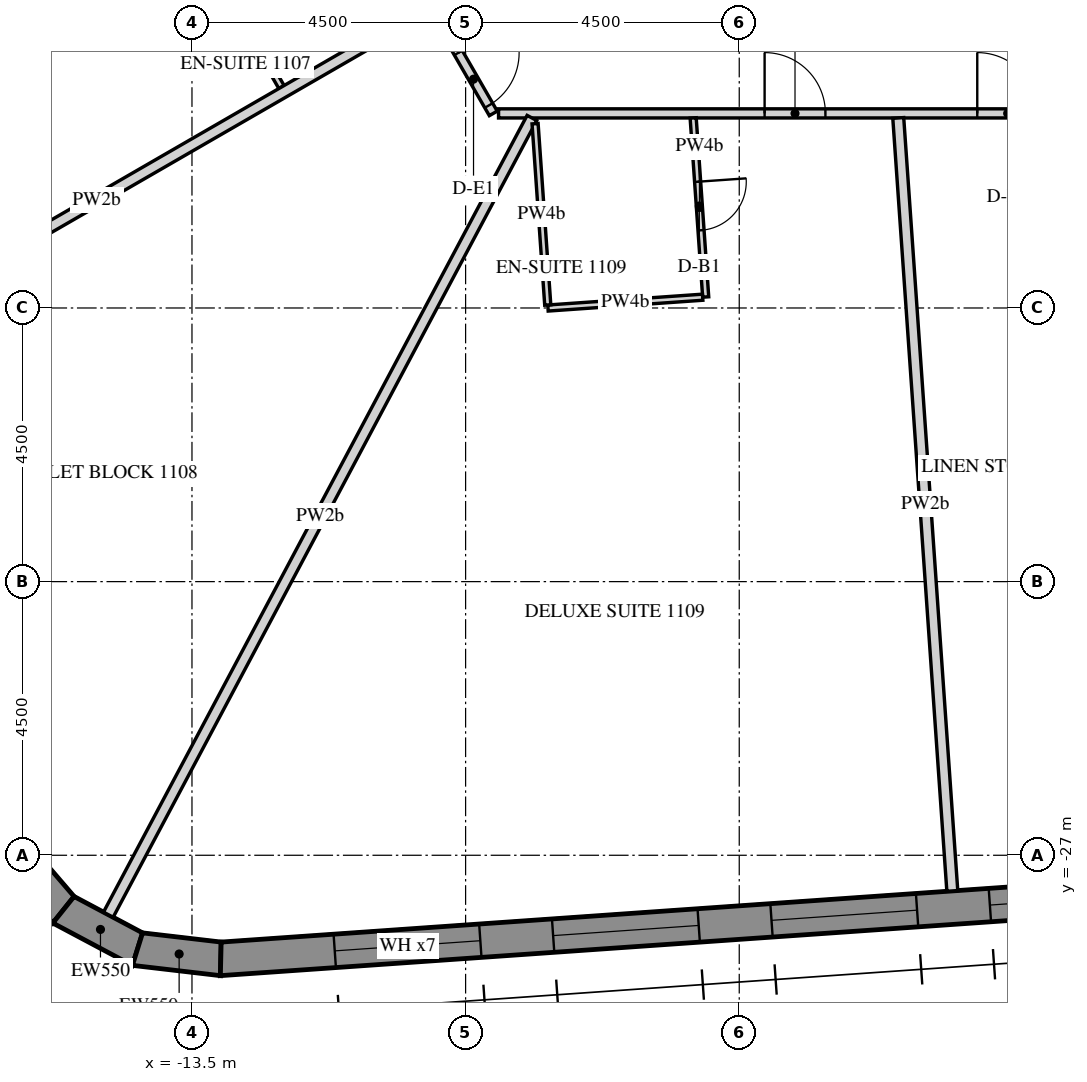
"""IFC4 building model, lengths in metres.
Left out: names, types, materials, properties, quantities, classifications, styles, units other than length and angle.
Written with IfcOpenShell. Run it as: python <this file> out.ifc"""

import sys

from ifc_helpers import new_model, si_unit, direction, frame, frame_2d, origin, place, context, subcontext, project, spatial, polyline, rectangle, outline, extrude, element, fill, save


model = new_model("IFC4")
c1 = context("Model", 3, precision=1e-05, world=origin(), true_north=direction((0.0, 1.0)))
c2 = subcontext(c1, "Body", "Model", "MODEL_VIEW")
j1 = project(units=[si_unit("LENGTHUNIT", "METRE"), si_unit("PLANEANGLEUNIT", "RADIAN")], contexts=[c1])
p1 = place(None, origin())
s1 = spatial("IfcSite", under=j1, at=p1, CompositionType="ELEMENT")
p2 = place(p1, origin())
s2 = spatial("IfcBuilding", under=s1, at=p2, CompositionType="ELEMENT")
p3 = place(p2, frame((0.0, 0.0, 156.6)))
s3 = spatial("IfcBuildingStorey", under=s2, at=p3, CompositionType="ELEMENT", Elevation=156.6)
p4 = place(p3, frame((-16.512, -26.85, -0.15), z_axis=(0.0, 0.0, 1.0), x_axis=(0.651621950847, -0.758543890078, 0.0)))
e1 = element("IfcWall", 1, at=p4, inside=s3, PredefinedType="SOLIDWALL", context=c2, shape_type="SweptSolid", body=[
    extrude(outline(polyline([(-0.026, -0.275), (1.431, -0.275), (1.327, 0.275), (0.026, 0.275), (-0.026, -0.275)])), origin(), (0.0, 0.0, 1.0), 3.9),
])
p5 = place(p3, frame((-15.614, -27.896, -0.15), z_axis=(0.0, 0.0, 1.0), x_axis=(0.882994189209, -0.469383917304, 0.0)))
e2 = element("IfcWall", 2, at=p5, inside=s3, PredefinedType="SOLIDWALL", context=c2, shape_type="SweptSolid", body=[
    extrude(outline(polyline([(-0.052, -0.275), (1.431, -0.275), (1.327, 0.275), (0.052, 0.275), (-0.052, -0.275)])), origin(), (0.0, 0.0, 1.0), 3.9),
])
p6 = place(p3, frame((-14.396, -28.543, -0.15), z_axis=(0.0, 0.0, 1.0), x_axis=(0.993232537394, -0.11614269956, 0.0)))
e3 = element("IfcWall", 3, at=p6, inside=s3, PredefinedType="SOLIDWALL", context=c2, shape_type="SweptSolid", body=[
    extrude(outline(polyline([(-0.052, -0.275), (1.405, -0.275), (1.353, 0.275), (0.052, 0.275), (-0.052, -0.275)])), origin(), (0.0, 0.0, 1.0), 3.9),
])
p7 = place(p3, frame((-13.026, -28.704, -0.15), z_axis=(0.0, 0.0, 1.0), x_axis=(0.99756406806, 0.069756219185, 0.0)))
e4 = element("IfcWall", 4, at=p7, inside=s3, PredefinedType="SOLIDWALL", context=c2, shape_type="SweptSolid", body=[
    extrude(outline(polyline([(-0.026, -0.275), (27.78, -0.275), (27.735, 0.275), (0.026, 0.275), (-0.026, -0.275)])), origin(), (0.0, 0.0, 1.0), 3.9),
])
p8 = place(p7, frame((1.879, 0.0, 1.05)))
e5 = element("IfcOpeningElement", 5, at=p8, cuts=e4, PredefinedType="OPENING", context=c2, shape_type="SweptSolid", body=[
    extrude(rectangle(XDim=2.4, YDim=2.4, at=frame_2d((1.2, 1.2))), frame((0.0, 0.285, 0.0), z_axis=(0.0, -1.0, 0.0), x_axis=(1.0, 0.0, 0.0)), (0.0, 0.0, 1.0), 0.57),
])
p9 = place(p7, frame((5.479, 0.0, 1.05)))
e6 = element("IfcOpeningElement", 6, at=p9, cuts=e4, PredefinedType="OPENING", context=c2, shape_type="SweptSolid", body=[
    extrude(rectangle(XDim=2.4, YDim=2.4, at=frame_2d((1.2, 1.2))), frame((0.0, 0.285, 0.0), z_axis=(0.0, -1.0, 0.0), x_axis=(1.0, 0.0, 0.0)), (0.0, 0.0, 1.0), 0.57),
])
p10 = place(p7, frame((9.079, 0.0, 1.05)))
e7 = element("IfcOpeningElement", 7, at=p10, cuts=e4, PredefinedType="OPENING", context=c2, shape_type="SweptSolid", body=[
    extrude(rectangle(XDim=2.4, YDim=2.4, at=frame_2d((1.2, 1.2))), frame((0.0, 0.285, 0.0), z_axis=(0.0, -1.0, 0.0), x_axis=(1.0, 0.0, 0.0)), (0.0, 0.0, 1.0), 0.57),
])
p11 = place(p7, frame((12.679, 0.0, 1.05)))
e8 = element("IfcOpeningElement", 8, at=p11, cuts=e4, PredefinedType="OPENING", context=c2, shape_type="SweptSolid", body=[
    extrude(rectangle(XDim=2.4, YDim=2.4, at=frame_2d((1.2, 1.2))), frame((0.0, 0.285, 0.0), z_axis=(0.0, -1.0, 0.0), x_axis=(1.0, 0.0, 0.0)), (0.0, 0.0, 1.0), 0.57),
])
p12 = place(p7, frame((16.279, 0.0, 1.05)))
e9 = element("IfcOpeningElement", 9, at=p12, cuts=e4, PredefinedType="OPENING", context=c2, shape_type="SweptSolid", body=[
    extrude(rectangle(XDim=2.4, YDim=2.4, at=frame_2d((1.2, 1.2))), frame((0.0, 0.285, 0.0), z_axis=(0.0, -1.0, 0.0), x_axis=(1.0, 0.0, 0.0)), (0.0, 0.0, 1.0), 0.57),
])
p13 = place(p7, frame((19.879, 0.0, 1.05)))
e10 = element("IfcOpeningElement", 10, at=p13, cuts=e4, PredefinedType="OPENING", context=c2, shape_type="SweptSolid", body=[
    extrude(rectangle(XDim=2.4, YDim=2.4, at=frame_2d((1.2, 1.2))), frame((0.0, 0.285, 0.0), z_axis=(0.0, -1.0, 0.0), x_axis=(1.0, 0.0, 0.0)), (0.0, 0.0, 1.0), 0.57),
])
p14 = place(p7, frame((23.479, 0.0, 1.05)))
e11 = element("IfcOpeningElement", 11, at=p14, cuts=e4, PredefinedType="OPENING", context=c2, shape_type="SweptSolid", body=[
    extrude(rectangle(XDim=2.4, YDim=2.4, at=frame_2d((1.2, 1.2))), frame((0.0, 0.285, 0.0), z_axis=(0.0, -1.0, 0.0), x_axis=(1.0, 0.0, 0.0)), (0.0, 0.0, 1.0), 0.57),
])
p15 = place(p3, frame((-15.863, -2.125, 0.0), z_axis=(0.0, 0.0, 1.0), x_axis=(0.500008833422, -0.866020303746, 0.0)))
e12 = element("IfcWall", 12, at=p15, inside=s3, PredefinedType="PARTITIONING", context=c2, shape_type="SweptSolid", body=[
    extrude(rectangle(XDim=14.636, YDim=0.15, at=frame_2d((7.318, 0.0))), origin(), (0.0, 0.0, 1.0), 2.823),
])
p16 = place(p15, frame((0.961, 0.0, 0.0)))
e13 = element("IfcOpeningElement", 13, at=p16, cuts=e12, PredefinedType="OPENING", context=c2, shape_type="SweptSolid", body=[
    extrude(rectangle(XDim=1.0, YDim=2.1, at=frame_2d((0.5, 1.05))), frame((0.0, 0.085, 0.0), z_axis=(0.0, -1.0, 0.0), x_axis=(1.0, 0.0, 0.0)), (0.0, 0.0, 1.0), 0.17),
])
p17 = place(p15, frame((7.309, 0.0, 0.0)))
e14 = element("IfcOpeningElement", 14, at=p17, cuts=e12, PredefinedType="OPENING", context=c2, shape_type="SweptSolid", body=[
    extrude(rectangle(XDim=1.0, YDim=2.1, at=frame_2d((0.5, 1.05))), frame((0.0, 0.085, 0.0), z_axis=(0.0, -1.0, 0.0), x_axis=(1.0, 0.0, 0.0)), (0.0, 0.0, 1.0), 0.17),
])
p18 = place(p15, frame((13.486, 0.0, 0.0)))
e15 = element("IfcOpeningElement", 15, at=p18, cuts=e12, PredefinedType="OPENING", context=c2, shape_type="SweptSolid", body=[
    extrude(rectangle(XDim=1.0, YDim=2.1, at=frame_2d((0.5, 1.05))), frame((0.0, 0.085, 0.0), z_axis=(0.0, -1.0, 0.0), x_axis=(1.0, 0.0, 0.0)), (0.0, 0.0, 1.0), 0.17),
])
p19 = place(p3, frame((-8.458, -14.8, 0.0), z_axis=(0.0, 0.0, 1.0), x_axis=(1.0, 0.0, 0.0)))
e16 = element("IfcWall", 16, at=p19, inside=s3, PredefinedType="PARTITIONING", context=c2, shape_type="SweptSolid", body=[
    extrude(rectangle(XDim=14.549, YDim=0.15, at=frame_2d((7.275, 0.0))), origin(), (0.0, 0.0, 1.0), 2.823),
])
p20 = place(p19, frame((4.375, 0.0, 0.0)))
e17 = element("IfcOpeningElement", 17, at=p20, cuts=e16, PredefinedType="OPENING", context=c2, shape_type="SweptSolid", body=[
    extrude(rectangle(XDim=1.0, YDim=2.1, at=frame_2d((0.5, 1.05))), frame((0.0, 0.085, 0.0), z_axis=(0.0, -1.0, 0.0), x_axis=(1.0, 0.0, 0.0)), (0.0, 0.0, 1.0), 0.17),
])
p21 = place(p19, frame((7.872, 0.0, 0.0)))
e18 = element("IfcOpeningElement", 18, at=p21, cuts=e16, PredefinedType="OPENING", context=c2, shape_type="SweptSolid", body=[
    extrude(rectangle(XDim=1.0, YDim=2.1, at=frame_2d((0.5, 1.05))), frame((0.0, 0.085, 0.0), z_axis=(0.0, -1.0, 0.0), x_axis=(1.0, 0.0, 0.0)), (0.0, 0.0, 1.0), 0.17),
])
p22 = place(p19, frame((10.609, 0.0, 0.0)))
e19 = element("IfcOpeningElement", 19, at=p22, cuts=e16, PredefinedType="OPENING", context=c2, shape_type="SweptSolid", body=[
    extrude(rectangle(XDim=1.0, YDim=2.1, at=frame_2d((0.5, 1.05))), frame((0.0, 0.085, 0.0), z_axis=(0.0, -1.0, 0.0), x_axis=(1.0, 0.0, 0.0)), (0.0, 0.0, 1.0), 0.17),
])
p23 = place(p3, frame((-12.028, -14.367, 0.0), z_axis=(0.0, 0.0, 1.0), x_axis=(-0.500015210774, 0.866016621662, 0.0)))
e20 = element("IfcWall", 20, at=p23, inside=s3, PredefinedType="PARTITIONING", context=c2, shape_type="SweptSolid", body=[
    extrude(rectangle(XDim=2.31, YDim=0.1, at=frame_2d((1.155, 0.0))), origin(), (0.0, 0.0, 1.0), 2.823),
])
p24 = place(p3, frame((-20.513, -19.37, 0.0), z_axis=(0.0, 0.0, 1.0), x_axis=(0.866019402111, 0.500010395058, 0.0)))
e21 = element("IfcWall", 21, at=p24, inside=s3, PredefinedType="PARTITIONING", context=c2, shape_type="SweptSolid", body=[
    extrude(rectangle(XDim=12.575, YDim=0.18, at=frame_2d((6.288, 0.0))), origin(), (0.0, 0.0, 1.0), 2.823),
])
p25 = place(p3, frame((-14.876, -27.977, 0.0), z_axis=(0.0, 0.0, 1.0), x_axis=(0.469475175214, 0.882945672088, 0.0)))
e22 = element("IfcWall", 22, at=p25, inside=s3, PredefinedType="PARTITIONING", context=c2, shape_type="SweptSolid", body=[
    extrude(rectangle(XDim=14.839, YDim=0.18, at=frame_2d((7.419, 0.0))), origin(), (0.0, 0.0, 1.0), 2.823),
])
p26 = place(p3, frame((-5.258, -14.875, 0.0), z_axis=(0.0, 0.0, 1.0), x_axis=(0.069812665072, -0.997560119389, 0.0)))
e23 = element("IfcWall", 23, at=p26, inside=s3, PredefinedType="PARTITIONING", context=c2, shape_type="SweptSolid", body=[
    extrude(rectangle(XDim=2.951, YDim=0.1, at=frame_2d((1.476, 0.0))), origin(), (0.0, 0.0, 1.0), 2.823),
])
p27 = place(p26, frame((1.052, 0.0, 0.0)))
e24 = element("IfcOpeningElement", 24, at=p27, cuts=e23, PredefinedType="OPENING", context=c2, shape_type="SweptSolid", body=[
    extrude(rectangle(XDim=0.8, YDim=2.1, at=frame_2d((0.4, 1.05))), frame((0.0, 0.06, 0.0), z_axis=(0.0, -1.0, 0.0), x_axis=(1.0, 0.0, 0.0)), (0.0, 0.0, 1.0), 0.12),
])
p28 = place(p3, frame((-5.102, -17.823, 0.0), z_axis=(0.0, 0.0, 1.0), x_axis=(-0.997561167558, -0.069797686069, 0.0)))
e25 = element("IfcWall", 25, at=p28, inside=s3, PredefinedType="PARTITIONING", context=c2, shape_type="SweptSolid", body=[
    extrude(rectangle(XDim=2.55, YDim=0.1, at=frame_2d((1.275, 0.0))), origin(), (0.0, 0.0, 1.0), 2.823),
])
p29 = place(p3, frame((-7.649, -17.951, 0.0), z_axis=(0.0, 0.0, 1.0), x_axis=(-0.069760844897, 0.997563744589, 0.0)))
e26 = element("IfcWall", 26, at=p29, inside=s3, PredefinedType="PARTITIONING", context=c2, shape_type="SweptSolid", body=[
    extrude(rectangle(XDim=2.989, YDim=0.1, at=frame_2d((1.494, 0.0))), origin(), (0.0, 0.0, 1.0), 2.823),
])
p30 = place(p3, frame((-0.996, -27.587, 0.0), z_axis=(0.0, 0.0, 1.0), x_axis=(-0.069758774678, 0.99756388936, 0.0)))
e27 = element("IfcWall", 27, at=p30, inside=s3, PredefinedType="PARTITIONING", context=c2, shape_type="SweptSolid", body=[
    extrude(rectangle(XDim=12.743, YDim=0.18, at=frame_2d((6.371, 0.0))), origin(), (0.0, 0.0, 1.0), 2.823),
])
p31 = place(p8, frame((0.0, 0.205, 0.0)))
e28 = element("IfcWindow", 28, at=p31, inside=s3, PartitioningType="DOUBLE_PANEL_VERTICAL", PredefinedType="WINDOW", context=c2, shape_type="SweptSolid", body=[
    extrude(rectangle(XDim=2.4, YDim=2.4, at=frame_2d((1.2, 1.2))), frame((0.0, 0.03, 0.0), z_axis=(0.0, -1.0, 0.0), x_axis=(1.0, 0.0, 0.0)), (0.0, 0.0, 1.0), 0.06),
])
fill(e5, e28)
p32 = place(p9, frame((0.0, 0.205, 0.0)))
e29 = element("IfcWindow", 29, at=p32, inside=s3, PartitioningType="DOUBLE_PANEL_VERTICAL", PredefinedType="WINDOW", context=c2, shape_type="SweptSolid", body=[
    extrude(rectangle(XDim=2.4, YDim=2.4, at=frame_2d((1.2, 1.2))), frame((0.0, 0.03, 0.0), z_axis=(0.0, -1.0, 0.0), x_axis=(1.0, 0.0, 0.0)), (0.0, 0.0, 1.0), 0.06),
])
fill(e6, e29)
p33 = place(p10, frame((0.0, 0.205, 0.0)))
e30 = element("IfcWindow", 30, at=p33, inside=s3, PartitioningType="DOUBLE_PANEL_VERTICAL", PredefinedType="WINDOW", context=c2, shape_type="SweptSolid", body=[
    extrude(rectangle(XDim=2.4, YDim=2.4, at=frame_2d((1.2, 1.2))), frame((0.0, 0.03, 0.0), z_axis=(0.0, -1.0, 0.0), x_axis=(1.0, 0.0, 0.0)), (0.0, 0.0, 1.0), 0.06),
])
fill(e7, e30)
p34 = place(p11, frame((0.0, 0.205, 0.0)))
e31 = element("IfcWindow", 31, at=p34, inside=s3, PartitioningType="DOUBLE_PANEL_VERTICAL", PredefinedType="WINDOW", context=c2, shape_type="SweptSolid", body=[
    extrude(rectangle(XDim=2.4, YDim=2.4, at=frame_2d((1.2, 1.2))), frame((0.0, 0.03, 0.0), z_axis=(0.0, -1.0, 0.0), x_axis=(1.0, 0.0, 0.0)), (0.0, 0.0, 1.0), 0.06),
])
fill(e8, e31)
p35 = place(p18, origin())
e32 = element("IfcDoor", 32, at=p35, inside=s3, OperationType="SINGLE_SWING_LEFT", PredefinedType="DOOR", context=c2, shape_type="SweptSolid", body=[
    extrude(rectangle(XDim=1.0, YDim=2.1, at=frame_2d((0.5, 1.05))), frame((0.0, 0.025, 0.0), z_axis=(0.0, -1.0, 0.0), x_axis=(1.0, 0.0, 0.0)), (0.0, 0.0, 1.0), 0.05),
])
fill(e15, e32)
p36 = place(p20, origin())
e33 = element("IfcDoor", 33, at=p36, inside=s3, OperationType="SINGLE_SWING_LEFT", PredefinedType="DOOR", context=c2, shape_type="SweptSolid", body=[
    extrude(rectangle(XDim=1.0, YDim=2.1, at=frame_2d((0.5, 1.05))), frame((0.0, 0.025, 0.0), z_axis=(0.0, -1.0, 0.0), x_axis=(1.0, 0.0, 0.0)), (0.0, 0.0, 1.0), 0.05),
])
fill(e17, e33)
p37 = place(p27, origin())
e34 = element("IfcDoor", 34, at=p37, inside=s3, OperationType="SINGLE_SWING_LEFT", PredefinedType="DOOR", context=c2, shape_type="SweptSolid", body=[
    extrude(rectangle(XDim=0.8, YDim=2.1, at=frame_2d((0.4, 1.05))), frame((0.0, 0.025, 0.0), z_axis=(0.0, -1.0, 0.0), x_axis=(1.0, 0.0, 0.0)), (0.0, 0.0, 1.0), 0.05),
])
fill(e24, e34)
p38 = place(p21, origin())
e35 = element("IfcDoor", 35, at=p38, inside=s3, OperationType="SINGLE_SWING_RIGHT", PredefinedType="DOOR", context=c2, shape_type="SweptSolid", body=[
    extrude(rectangle(XDim=1.0, YDim=2.1, at=frame_2d((0.5, 1.05))), frame((0.0, 0.025, 0.0), z_axis=(0.0, -1.0, 0.0), x_axis=(1.0, 0.0, 0.0)), (0.0, 0.0, 1.0), 0.05),
])
fill(e18, e35)
save(model, sys.argv[1])
